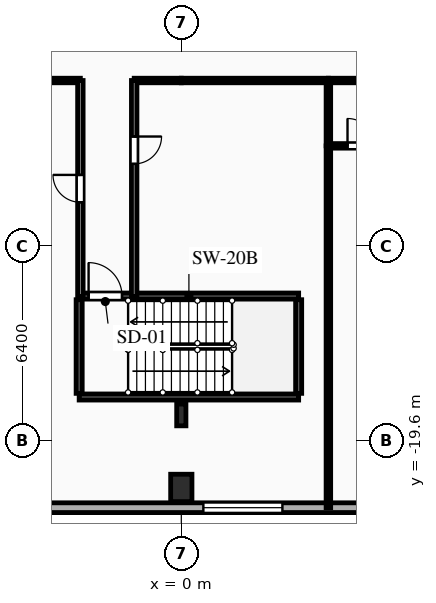
"""IFC4 building model, lengths in metres.
Left out: names, types, materials, properties, quantities, classifications, styles, units other than length and angle.
Written with IfcOpenShell. Run it as: python <this file> out.ifc"""

import sys

from ifc_helpers import new_model, si_unit, direction, frame, frame_2d, origin, origin_2d, place, context, subcontext, project, spatial, rectangle, i_section, extrude, element, fill, save


model = new_model("IFC4")
c1 = context("Model", 3, precision=1e-05, world=origin(), true_north=direction((0.0, 1.0)))
c2 = subcontext(c1, "Body", "Model", "MODEL_VIEW")
j1 = project(units=[si_unit("LENGTHUNIT", "METRE"), si_unit("PLANEANGLEUNIT", "RADIAN")], contexts=[c1])
p1 = place(None, origin())
s1 = spatial("IfcSite", under=j1, at=p1, CompositionType="ELEMENT")
p2 = place(p1, origin())
s2 = spatial("IfcBuilding", under=s1, at=p2, CompositionType="ELEMENT")
p3 = place(p2, frame((0.0, 0.0, 18.0)))
s3 = spatial("IfcBuildingStorey", under=s2, at=p3, CompositionType="ELEMENT", Elevation=18.0)
p4 = place(p3, frame((0.0, -21.15, 0.0), z_axis=(0.0, 0.0, 1.0), x_axis=(1.0, 0.0, 0.0)))
e1 = element("IfcColumn", 1, at=p4, inside=s3, PredefinedType="COLUMN", context=c2, shape_type="SweptSolid", body=[
    extrude(rectangle(XDim=0.7, YDim=0.9, at=origin_2d()), origin(), (0.0, 0.0, 1.0), 4.5),
])
p5 = place(p3, frame((0.0, -18.75, 0.0), z_axis=(0.0, 0.0, 1.0), x_axis=(1.0, 0.0, 0.0)))
e2 = element("IfcColumn", 2, at=p5, inside=s3, PredefinedType="COLUMN", context=c2, shape_type="SweptSolid", body=[
    extrude(i_section(OverallWidth=0.304, OverallDepth=0.716, WebThickness=0.021, FlangeThickness=0.04, FilletRadius=0.027, at=origin_2d()), origin(), (0.0, 0.0, 1.0), 4.5),
])
p6 = place(p3, frame((36.8, -21.8, 0.0), z_axis=(0.0, 0.0, 1.0), x_axis=(-1.0, 0.0, 0.0)))
e3 = element("IfcWall", 3, at=p6, inside=s3, PredefinedType="SOLIDWALL", context=c2, shape_type="SweptSolid", body=[
    extrude(rectangle(XDim=73.6, YDim=0.32, at=frame_2d((36.8, 0.0))), origin(), (0.0, 0.0, 1.0), 4.17),
])
p7 = place(p6, frame((1.079, 0.0, 0.85)))
e4 = element("IfcOpeningElement", 4, at=p7, cuts=e3, PredefinedType="OPENING", context=c2, shape_type="SweptSolid", body=[
    extrude(rectangle(XDim=2.3, YDim=2.4, at=frame_2d((1.15, 1.2))), frame((0.0, 0.17, 0.0), z_axis=(0.0, -1.0, 0.0), x_axis=(1.0, 0.0, 0.0)), (0.0, 0.0, 1.0), 0.34),
])
p8 = place(p6, frame((8.431, 0.0, 0.85)))
e5 = element("IfcOpeningElement", 5, at=p8, cuts=e3, PredefinedType="OPENING", context=c2, shape_type="SweptSolid", body=[
    extrude(rectangle(XDim=2.6, YDim=2.4, at=frame_2d((1.3, 1.2))), frame((0.0, 0.17, 0.0), z_axis=(0.0, -1.0, 0.0), x_axis=(1.0, 0.0, 0.0)), (0.0, 0.0, 1.0), 0.34),
])
p9 = place(p6, frame((13.324, 0.0, 0.85)))
e6 = element("IfcOpeningElement", 6, at=p9, cuts=e3, PredefinedType="OPENING", context=c2, shape_type="SweptSolid", body=[
    extrude(rectangle(XDim=1.1, YDim=1.85, at=frame_2d((0.55, 0.925))), frame((0.0, 0.17, 0.0), z_axis=(0.0, -1.0, 0.0), x_axis=(1.0, 0.0, 0.0)), (0.0, 0.0, 1.0), 0.34),
])
p10 = place(p6, frame((16.619, 0.0, 0.85)))
e7 = element("IfcOpeningElement", 7, at=p10, cuts=e3, PredefinedType="OPENING", context=c2, shape_type="SweptSolid", body=[
    extrude(rectangle(XDim=2.0, YDim=2.4, at=frame_2d((1.0, 1.2))), frame((0.0, 0.17, 0.0), z_axis=(0.0, -1.0, 0.0), x_axis=(1.0, 0.0, 0.0)), (0.0, 0.0, 1.0), 0.34),
])
p11 = place(p6, frame((21.125, 0.0, 0.85)))
e8 = element("IfcOpeningElement", 8, at=p11, cuts=e3, PredefinedType="OPENING", context=c2, shape_type="SweptSolid", body=[
    extrude(rectangle(XDim=2.6, YDim=2.4, at=frame_2d((1.3, 1.2))), frame((0.0, 0.17, 0.0), z_axis=(0.0, -1.0, 0.0), x_axis=(1.0, 0.0, 0.0)), (0.0, 0.0, 1.0), 0.34),
])
p12 = place(p6, frame((27.531, 0.0, 0.85)))
e9 = element("IfcOpeningElement", 9, at=p12, cuts=e3, PredefinedType="OPENING", context=c2, shape_type="SweptSolid", body=[
    extrude(rectangle(XDim=2.6, YDim=2.4, at=frame_2d((1.3, 1.2))), frame((0.0, 0.17, 0.0), z_axis=(0.0, -1.0, 0.0), x_axis=(1.0, 0.0, 0.0)), (0.0, 0.0, 1.0), 0.34),
])
p13 = place(p6, frame((33.474, 0.0, 0.85)))
e10 = element("IfcOpeningElement", 10, at=p13, cuts=e3, PredefinedType="OPENING", context=c2, shape_type="SweptSolid", body=[
    extrude(rectangle(XDim=2.6, YDim=2.4, at=frame_2d((1.3, 1.2))), frame((0.0, 0.17, 0.0), z_axis=(0.0, -1.0, 0.0), x_axis=(1.0, 0.0, 0.0)), (0.0, 0.0, 1.0), 0.34),
])
p14 = place(p6, frame((41.427, 0.0, 0.85)))
e11 = element("IfcOpeningElement", 11, at=p14, cuts=e3, PredefinedType="OPENING", context=c2, shape_type="SweptSolid", body=[
    extrude(rectangle(XDim=2.6, YDim=2.4, at=frame_2d((1.3, 1.2))), frame((0.0, 0.17, 0.0), z_axis=(0.0, -1.0, 0.0), x_axis=(1.0, 0.0, 0.0)), (0.0, 0.0, 1.0), 0.34),
])
p15 = place(p6, frame((48.177, 0.0, 0.85)))
e12 = element("IfcOpeningElement", 12, at=p15, cuts=e3, PredefinedType="OPENING", context=c2, shape_type="SweptSolid", body=[
    extrude(rectangle(XDim=2.0, YDim=2.4, at=frame_2d((1.0, 1.2))), frame((0.0, 0.17, 0.0), z_axis=(0.0, -1.0, 0.0), x_axis=(1.0, 0.0, 0.0)), (0.0, 0.0, 1.0), 0.34),
])
p16 = place(p6, frame((51.798, 0.0, 0.85)))
e13 = element("IfcOpeningElement", 13, at=p16, cuts=e3, PredefinedType="OPENING", context=c2, shape_type="SweptSolid", body=[
    extrude(rectangle(XDim=2.6, YDim=2.4, at=frame_2d((1.3, 1.2))), frame((0.0, 0.17, 0.0), z_axis=(0.0, -1.0, 0.0), x_axis=(1.0, 0.0, 0.0)), (0.0, 0.0, 1.0), 0.34),
])
p17 = place(p6, frame((56.111, 0.0, 0.85)))
e14 = element("IfcOpeningElement", 14, at=p17, cuts=e3, PredefinedType="OPENING", context=c2, shape_type="SweptSolid", body=[
    extrude(rectangle(XDim=2.3, YDim=2.4, at=frame_2d((1.15, 1.2))), frame((0.0, 0.17, 0.0), z_axis=(0.0, -1.0, 0.0), x_axis=(1.0, 0.0, 0.0)), (0.0, 0.0, 1.0), 0.34),
])
p18 = place(p6, frame((62.649, 0.0, 0.85)))
e15 = element("IfcOpeningElement", 15, at=p18, cuts=e3, PredefinedType="OPENING", context=c2, shape_type="SweptSolid", body=[
    extrude(rectangle(XDim=2.6, YDim=2.4, at=frame_2d((1.3, 1.2))), frame((0.0, 0.17, 0.0), z_axis=(0.0, -1.0, 0.0), x_axis=(1.0, 0.0, 0.0)), (0.0, 0.0, 1.0), 0.34),
])
p19 = place(p6, frame((70.301, 0.0, 0.85)))
e16 = element("IfcOpeningElement", 16, at=p19, cuts=e3, PredefinedType="OPENING", context=c2, shape_type="SweptSolid", body=[
    extrude(rectangle(XDim=2.3, YDim=2.4, at=frame_2d((1.15, 1.2))), frame((0.0, 0.17, 0.0), z_axis=(0.0, -1.0, 0.0), x_axis=(1.0, 0.0, 0.0)), (0.0, 0.0, 1.0), 0.34),
])
p20 = place(p3, frame((-3.36, -14.84, 0.0), z_axis=(0.0, 0.0, 1.0), x_axis=(1.0, 0.0, 0.0)))
e17 = element("IfcWall", 17, at=p20, inside=s3, PredefinedType="SHEAR", context=c2, shape_type="SweptSolid", body=[
    extrude(rectangle(XDim=7.22, YDim=0.2, at=frame_2d((3.61, 0.0))), origin(), (0.0, 0.0, 1.0), 4.17),
])
p21 = place(p20, frame((0.31, 0.0, 0.0)))
e18 = element("IfcOpeningElement", 18, at=p21, cuts=e17, PredefinedType="OPENING", context=c2, shape_type="SweptSolid", body=[
    extrude(rectangle(XDim=1.1, YDim=2.15, at=frame_2d((0.55, 1.075))), frame((0.0, 0.11, 0.0), z_axis=(0.0, -1.0, 0.0), x_axis=(1.0, 0.0, 0.0)), (0.0, 0.0, 1.0), 0.22),
])
p22 = place(p3, frame((-3.36, -18.16, 0.0), z_axis=(0.0, 0.0, 1.0), x_axis=(1.0, 0.0, 0.0)))
e19 = element("IfcWall", 19, at=p22, inside=s3, PredefinedType="SHEAR", context=c2, shape_type="SweptSolid", body=[
    extrude(rectangle(XDim=7.22, YDim=0.2, at=frame_2d((3.61, 0.0))), origin(), (0.0, 0.0, 1.0), 4.17),
])
for number, where, z_axis, x_axis in (
    (20, (-3.36, -18.04, 0.0), (0.0, 0.0, 1.0), (0.0, 1.0, 0.0)),
    (21, (3.86, -18.04, 0.0), (0.0, 0.0, 1.0), (0.0, 1.0, 0.0)),
):
    element("IfcWall", number, at=place(p3, frame(where, z_axis=z_axis, x_axis=x_axis)), inside=s3, PredefinedType="SHEAR", context=c2, shape_type="SweptSolid", body=[
        extrude(rectangle(XDim=3.08, YDim=0.2, at=frame_2d((1.54, 0.0))), origin(), (0.0, 0.0, 1.0), 4.17),
    ])
p23 = place(p3, frame((-3.32, -7.75, 0.0), z_axis=(0.0, 0.0, 1.0), x_axis=(-1.0, 0.0, 0.0)))
e22 = element("IfcWall", 22, at=p23, inside=s3, PredefinedType="PARTITIONING", context=c2, shape_type="SweptSolid", body=[
    extrude(rectangle(XDim=5.17, YDim=0.15, at=frame_2d((2.585, 0.0))), origin(), (0.0, 0.0, 1.0), 4.17),
])
p24 = place(p3, frame((0.0, -7.75, 0.0), z_axis=(0.0, 0.0, 1.0), x_axis=(-1.0, 0.0, 0.0)))
e23 = element("IfcWall", 23, at=p24, inside=s3, PredefinedType="PARTITIONING", context=c2, shape_type="SweptSolid", body=[
    extrude(rectangle(XDim=1.55, YDim=0.15, at=frame_2d((0.775, 0.0))), origin(), (0.0, 0.0, 1.0), 4.17),
])
p25 = place(p3, frame((4.838, -7.75, 0.0), z_axis=(0.0, 0.0, 1.0), x_axis=(-1.0, 0.0, 0.0)))
e24 = element("IfcWall", 24, at=p25, inside=s3, PredefinedType="PARTITIONING", context=c2, shape_type="SweptSolid", body=[
    extrude(rectangle(XDim=4.838, YDim=0.15, at=frame_2d((2.419, 0.0))), origin(), (0.0, 0.0, 1.0), 4.17),
])
p26 = place(p3, frame((7.288, -7.75, 0.0), z_axis=(0.0, 0.0, 1.0), x_axis=(-1.0, 0.0, 0.0)))
e25 = element("IfcWall", 25, at=p26, inside=s3, PredefinedType="PLUMBINGWALL", context=c2, shape_type="SweptSolid", body=[
    extrude(rectangle(XDim=2.45, YDim=0.15, at=frame_2d((1.225, 0.0))), origin(), (0.0, 0.0, 1.0), 4.17),
])
p27 = place(p3, frame((-3.32, -14.86, 0.0), z_axis=(0.0, 0.0, 1.0), x_axis=(0.0, 1.0, 0.0)))
e26 = element("IfcWall", 26, at=p27, inside=s3, PredefinedType="PARTITIONING", context=c2, shape_type="SweptSolid", body=[
    extrude(rectangle(XDim=7.11, YDim=0.18, at=frame_2d((3.555, 0.0))), origin(), (0.0, 0.0, 1.0), 4.17),
])
p28 = place(p27, frame((3.105, 0.0, 0.0)))
e27 = element("IfcOpeningElement", 27, at=p28, cuts=e26, PredefinedType="OPENING", context=c2, shape_type="SweptSolid", body=[
    extrude(rectangle(XDim=0.9, YDim=2.1, at=frame_2d((0.45, 1.05))), frame((0.0, 0.1, 0.0), z_axis=(0.0, -1.0, 0.0), x_axis=(1.0, 0.0, 0.0)), (0.0, 0.0, 1.0), 0.2),
])
p29 = place(p3, frame((-1.55, -7.75, 0.0), z_axis=(0.0, 0.0, 1.0), x_axis=(0.0, -1.0, 0.0)))
e28 = element("IfcWall", 28, at=p29, inside=s3, PredefinedType="PARTITIONING", context=c2, shape_type="SweptSolid", body=[
    extrude(rectangle(XDim=7.11, YDim=0.18, at=frame_2d((3.555, 0.0))), origin(), (0.0, 0.0, 1.0), 4.17),
])
p30 = place(p29, frame((1.843, 0.0, 0.0)))
e29 = element("IfcOpeningElement", 29, at=p30, cuts=e28, PredefinedType="OPENING", context=c2, shape_type="SweptSolid", body=[
    extrude(rectangle(XDim=0.9, YDim=2.1, at=frame_2d((0.45, 1.05))), frame((0.0, 0.1, 0.0), z_axis=(0.0, -1.0, 0.0), x_axis=(1.0, 0.0, 0.0)), (0.0, 0.0, 1.0), 0.2),
])
p31 = place(p3, frame((4.838, -9.9, 0.0), z_axis=(0.0, 0.0, 1.0), x_axis=(0.0, -1.0, 0.0)))
e30 = element("IfcWall", 30, at=p31, inside=s3, PredefinedType="PARTITIONING", context=c2, shape_type="SweptSolid", body=[
    extrude(rectangle(XDim=11.9, YDim=0.15, at=frame_2d((5.95, 0.0))), origin(), (0.0, 0.0, 1.0), 4.17),
])
p32 = place(p3, frame((4.838, -7.75, 0.0), z_axis=(0.0, 0.0, 1.0), x_axis=(0.0, -1.0, 0.0)))
e31 = element("IfcWall", 31, at=p32, inside=s3, PredefinedType="PLUMBINGWALL", context=c2, shape_type="SweptSolid", body=[
    extrude(rectangle(XDim=2.15, YDim=0.15, at=frame_2d((1.075, 0.0))), origin(), (0.0, 0.0, 1.0), 4.17),
])
p33 = place(p3, frame((4.838, -9.9, 0.0), z_axis=(0.0, 0.0, 1.0), x_axis=(1.0, 0.0, 0.0)))
e32 = element("IfcWall", 32, at=p33, inside=s3, PredefinedType="PLUMBINGWALL", context=c2, shape_type="SweptSolid", body=[
    extrude(rectangle(XDim=2.45, YDim=0.15, at=frame_2d((1.225, 0.0))), origin(), (0.0, 0.0, 1.0), 4.17),
])
p34 = place(p33, frame((0.629, 0.0, 0.0)))
e33 = element("IfcOpeningElement", 33, at=p34, cuts=e32, PredefinedType="OPENING", context=c2, shape_type="SweptSolid", body=[
    extrude(rectangle(XDim=0.9, YDim=2.1, at=frame_2d((0.45, 1.05))), frame((0.0, 0.085, 0.0), z_axis=(0.0, -1.0, 0.0), x_axis=(1.0, 0.0, 0.0)), (0.0, 0.0, 1.0), 0.17),
])
p35 = place(p13, origin())
e34 = element("IfcWindow", 34, at=p35, inside=s3, PartitioningType="SINGLE_PANEL", PredefinedType="WINDOW", context=c2, shape_type="SweptSolid", body=[
    extrude(rectangle(XDim=2.6, YDim=2.4, at=frame_2d((1.3, 1.2))), frame((0.0, 0.03, 0.0), z_axis=(0.0, -1.0, 0.0), x_axis=(1.0, 0.0, 0.0)), (0.0, 0.0, 1.0), 0.06),
])
fill(e10, e34)
p36 = place(p21, origin())
e35 = element("IfcDoor", 35, at=p36, inside=s3, OperationType="SINGLE_SWING_LEFT", PredefinedType="DOOR", context=c2, shape_type="SweptSolid", body=[
    extrude(rectangle(XDim=1.1, YDim=2.15, at=frame_2d((0.55, 1.075))), frame((0.0, 0.025, 0.0), z_axis=(0.0, -1.0, 0.0), x_axis=(1.0, 0.0, 0.0)), (0.0, 0.0, 1.0), 0.05),
])
fill(e18, e35)
p37 = place(p28, origin())
e36 = element("IfcDoor", 36, at=p37, inside=s3, OperationType="SINGLE_SWING_RIGHT", PredefinedType="DOOR", context=c2, shape_type="SweptSolid", body=[
    extrude(rectangle(XDim=0.9, YDim=2.1, at=frame_2d((0.45, 1.05))), frame((0.0, 0.025, 0.0), z_axis=(0.0, -1.0, 0.0), x_axis=(1.0, 0.0, 0.0)), (0.0, 0.0, 1.0), 0.05),
])
fill(e27, e36)
p38 = place(p30, origin())
e37 = element("IfcDoor", 37, at=p38, inside=s3, OperationType="SINGLE_SWING_LEFT", PredefinedType="DOOR", context=c2, shape_type="SweptSolid", body=[
    extrude(rectangle(XDim=0.9, YDim=2.1, at=frame_2d((0.45, 1.05))), frame((0.0, 0.025, 0.0), z_axis=(0.0, -1.0, 0.0), x_axis=(1.0, 0.0, 0.0)), (0.0, 0.0, 1.0), 0.05),
])
fill(e29, e37)
p39 = place(p34, origin())
e38 = element("IfcDoor", 38, at=p39, inside=s3, OperationType="SINGLE_SWING_LEFT", PredefinedType="DOOR", context=c2, shape_type="SweptSolid", body=[
    extrude(rectangle(XDim=0.9, YDim=2.1, at=frame_2d((0.45, 1.05))), frame((0.0, 0.025, 0.0), z_axis=(0.0, -1.0, 0.0), x_axis=(1.0, 0.0, 0.0)), (0.0, 0.0, 1.0), 0.05),
])
fill(e33, e38)
save(model, sys.argv[1])
